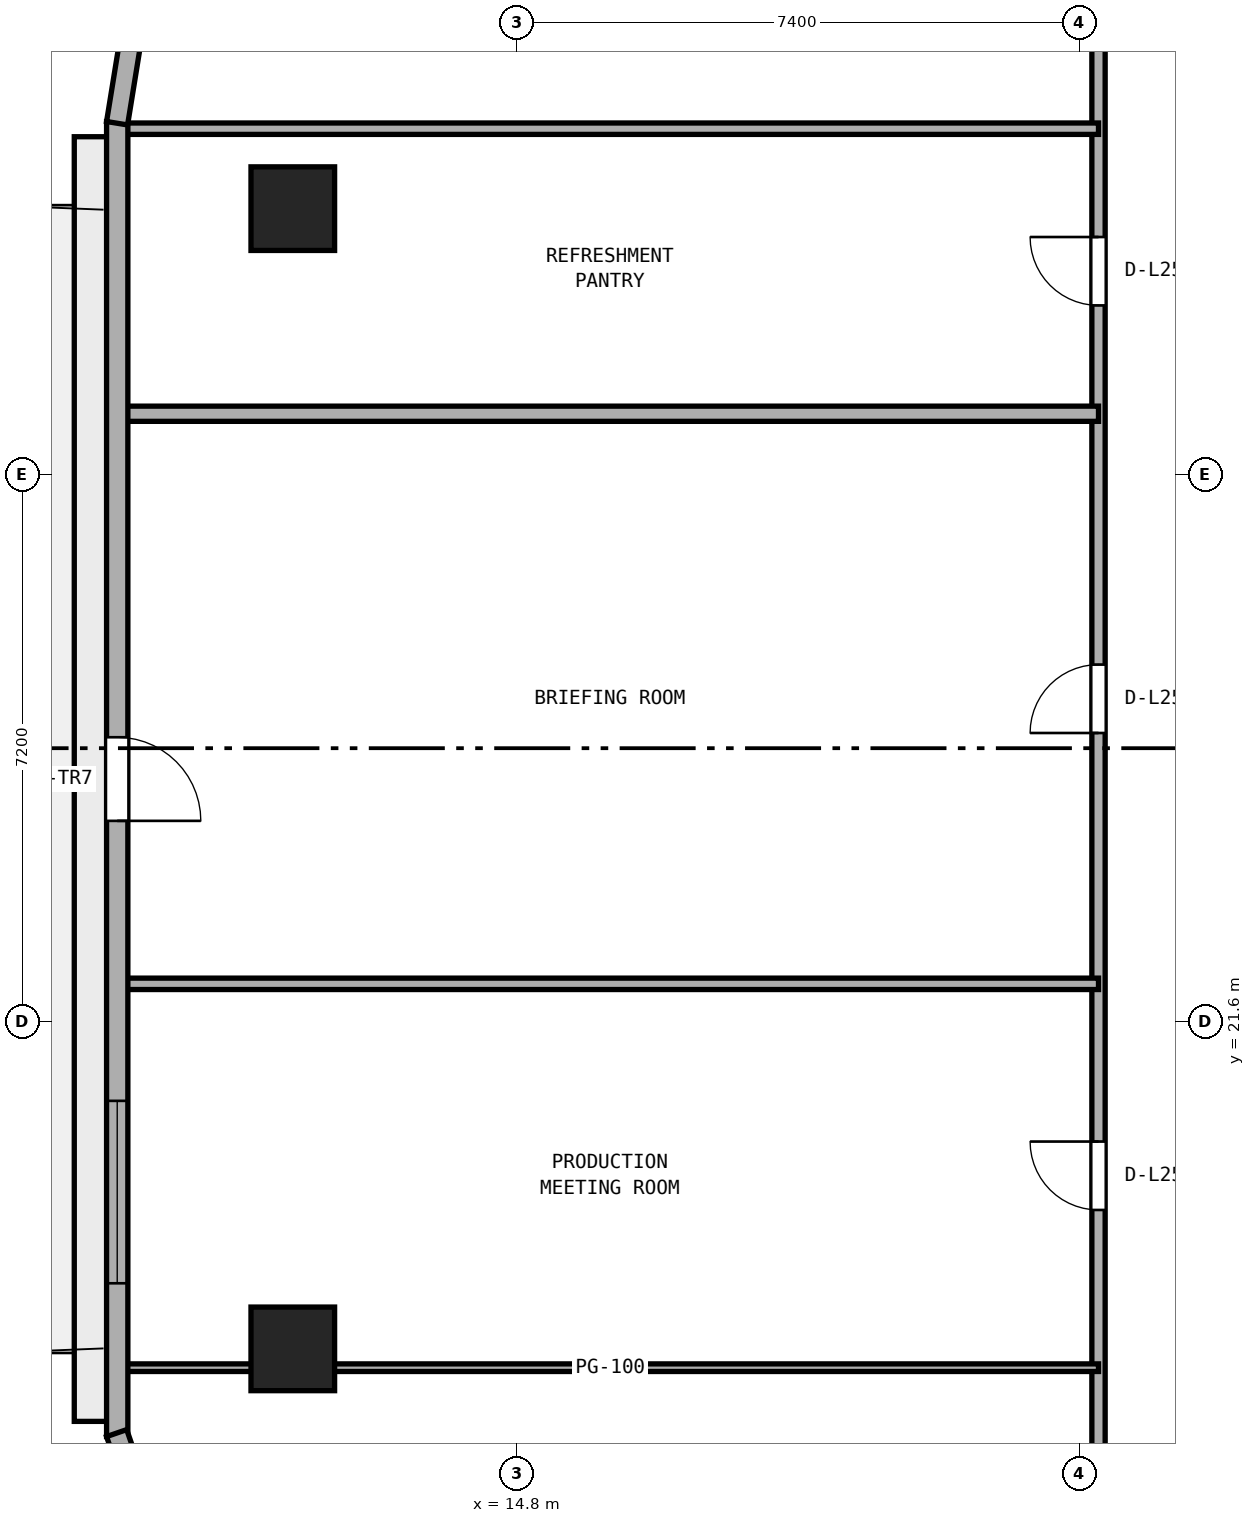
"""IFC4 building model, lengths in metres.
Left out: names, types, materials, properties, quantities, classifications, styles, units other than length and angle.
Written with IfcOpenShell. Run it as: python <this file> out.ifc"""

import sys

from ifc_helpers import new_model, si_unit, direction, frame, frame_2d, origin, origin_2d, place, context, subcontext, project, spatial, rectangle, extrude, element, fill, save


model = new_model("IFC4")
c1 = context("Model", 3, precision=1e-05, world=origin(), true_north=direction((0.0, 1.0)))
c2 = subcontext(c1, "Body", "Model", "MODEL_VIEW")
j1 = project(units=[si_unit("LENGTHUNIT", "METRE"), si_unit("PLANEANGLEUNIT", "RADIAN")], contexts=[c1])
p1 = place(None, origin())
s1 = spatial("IfcSite", under=j1, at=p1, CompositionType="ELEMENT")
p2 = place(p1, origin())
s2 = spatial("IfcBuilding", under=s1, at=p2, CompositionType="ELEMENT")
p3 = place(p2, frame((0.0, 0.0, 101.0)))
s3 = spatial("IfcBuildingStorey", under=s2, at=p3, CompositionType="ELEMENT", Elevation=101.0)
for number, where, z_axis, x_axis in (
    (1, (11.85, 32.298, 0.0), (0.0, 0.0, 1.0), (1.0, 0.0, 0.0)),
    (2, (11.85, 17.298, 0.0), (0.0, 0.0, 1.0), (1.0, 0.0, 0.0)),
):
    element("IfcColumn", number, at=place(p3, frame(where, z_axis=z_axis, x_axis=x_axis)), inside=s3, PredefinedType="COLUMN", context=c2, shape_type="SweptSolid", body=[
        extrude(rectangle(XDim=1.1, YDim=1.1, at=origin_2d()), origin(), (0.0, 0.0, 1.0), 3.8),
    ])
p4 = place(p3, frame((22.45, 14.05, 0.0), z_axis=(0.0, 0.0, 1.0), x_axis=(0.0, 1.0, 0.0)))
e3 = element("IfcWall", 3, at=p4, inside=s3, PredefinedType="PARTITIONING", context=c2, shape_type="SweptSolid", body=[
    extrude(rectangle(XDim=22.3, YDim=0.175, at=frame_2d((11.15, 0.0))), origin(), (0.0, 0.0, 1.0), 3.525),
])
p5 = place(p4, frame((5.075, 0.0, 0.0)))
e4 = element("IfcOpeningElement", 4, at=p5, cuts=e3, PredefinedType="OPENING", context=c2, shape_type="SweptSolid", body=[
    extrude(rectangle(XDim=0.9, YDim=2.1, at=frame_2d((0.45, 1.05))), frame((0.0, 0.097, 0.0), z_axis=(0.0, -1.0, 0.0), x_axis=(1.0, 0.0, 0.0)), (0.0, 0.0, 1.0), 0.195),
])
p6 = place(p4, frame((11.35, 0.0, 0.0)))
e5 = element("IfcOpeningElement", 5, at=p6, cuts=e3, PredefinedType="OPENING", context=c2, shape_type="SweptSolid", body=[
    extrude(rectangle(XDim=0.9, YDim=2.1, at=frame_2d((0.45, 1.05))), frame((0.0, 0.097, 0.0), z_axis=(0.0, -1.0, 0.0), x_axis=(1.0, 0.0, 0.0)), (0.0, 0.0, 1.0), 0.195),
])
p7 = place(p4, frame((16.975, 0.0, 0.0)))
e6 = element("IfcOpeningElement", 6, at=p7, cuts=e3, PredefinedType="OPENING", context=c2, shape_type="SweptSolid", body=[
    extrude(rectangle(XDim=0.9, YDim=2.1, at=frame_2d((0.45, 1.05))), frame((0.0, 0.097, 0.0), z_axis=(0.0, -1.0, 0.0), x_axis=(1.0, 0.0, 0.0)), (0.0, 0.0, 1.0), 0.195),
])
p8 = place(p3, frame((9.605, 17.05, 0.0), z_axis=(0.0, 0.0, 1.0), x_axis=(1.0, 0.0, 0.0)))
e7 = element("IfcWall", 7, at=p8, inside=s3, PredefinedType="PARTITIONING", context=c2, shape_type="SweptSolid", body=[
    extrude(rectangle(XDim=12.845, YDim=0.1, at=frame_2d((6.422, 0.0))), origin(), (0.0, 0.0, 1.0), 3.525),
])
p9 = place(p3, frame((9.605, 22.1, 0.0), z_axis=(0.0, 0.0, 1.0), x_axis=(1.0, 0.0, 0.0)))
e8 = element("IfcWall", 8, at=p9, inside=s3, PredefinedType="PARTITIONING", context=c2, shape_type="SweptSolid", body=[
    extrude(rectangle(XDim=12.845, YDim=0.15, at=frame_2d((6.422, 0.0))), origin(), (0.0, 0.0, 1.0), 3.525),
])
p10 = place(p3, frame((9.605, 29.6, 0.0), z_axis=(0.0, 0.0, 1.0), x_axis=(1.0, 0.0, 0.0)))
e9 = element("IfcWall", 9, at=p10, inside=s3, PredefinedType="PARTITIONING", context=c2, shape_type="SweptSolid", body=[
    extrude(rectangle(XDim=12.845, YDim=0.2, at=frame_2d((6.422, 0.0))), origin(), (0.0, 0.0, 1.0), 3.525),
])
p11 = place(p3, frame((9.605, 33.35, 0.0), z_axis=(0.0, 0.0, 1.0), x_axis=(1.0, 0.0, 0.0)))
e10 = element("IfcWall", 10, at=p11, inside=s3, PredefinedType="PARTITIONING", context=c2, shape_type="SweptSolid", body=[
    extrude(rectangle(XDim=12.845, YDim=0.15, at=frame_2d((6.422, 0.0))), origin(), (0.0, 0.0, 1.0), 3.525),
])
p12 = place(p3, frame((9.54, 33.444, 0.0), z_axis=(0.0, 0.0, 1.0), x_axis=(0.0, -1.0, 0.0)))
e11 = element("IfcWall", 11, at=p12, inside=s3, PredefinedType="STANDARD", context=c2, shape_type="SweptSolid", body=[
    extrude(rectangle(XDim=17.301, YDim=0.28, at=frame_2d((8.65, 0.0))), origin(), (0.0, 0.0, 1.0), 3.525),
])
p13 = place(p12, frame((8.1, 0.0, 0.0)))
e12 = element("IfcOpeningElement", 12, at=p13, cuts=e11, PredefinedType="OPENING", context=c2, shape_type="SweptSolid", body=[
    extrude(rectangle(XDim=1.1, YDim=2.2, at=frame_2d((0.55, 1.1))), frame((0.0, 0.15, 0.0), z_axis=(0.0, -1.0, 0.0), x_axis=(1.0, 0.0, 0.0)), (0.0, 0.0, 1.0), 0.3),
])
p14 = place(p12, frame((12.884, 0.0, 0.9)))
e13 = element("IfcOpeningElement", 13, at=p14, cuts=e11, PredefinedType="OPENING", context=c2, shape_type="SweptSolid", body=[
    extrude(rectangle(XDim=2.4, YDim=1.75, at=frame_2d((1.2, 0.875))), frame((0.0, 0.15, 0.0), z_axis=(0.0, -1.0, 0.0), x_axis=(1.0, 0.0, 0.0)), (0.0, 0.0, 1.0), 0.3),
])
p15 = place(p3, frame((9.753, 34.749, 0.0), z_axis=(0.0, 0.0, 1.0), x_axis=(-0.160037671962, -0.987110907423, 0.0)))
e14 = element("IfcWall", 14, at=p15, inside=s3, PredefinedType="STANDARD", context=c2, shape_type="SweptSolid", body=[
    extrude(rectangle(XDim=1.344, YDim=0.28, at=frame_2d((0.672, 0.0))), origin(), (0.0, 0.0, 1.0), 3.525),
])
p16 = place(p3, frame((9.532, 16.189, 0.0), z_axis=(0.0, 0.0, 1.0), x_axis=(0.32708309668, -0.944995580871, 0.0)))
e15 = element("IfcWall", 15, at=p16, inside=s3, PredefinedType="STANDARD", context=c2, shape_type="SweptSolid", body=[
    extrude(rectangle(XDim=2.748, YDim=0.28, at=frame_2d((1.374, 0.0))), origin(), (0.0, 0.0, 1.0), 3.525),
])
p17 = place(p5, origin())
e16 = element("IfcDoor", 16, at=p17, inside=s3, OperationType="SINGLE_SWING_RIGHT", PredefinedType="DOOR", context=c2, shape_type="SweptSolid", body=[
    extrude(rectangle(XDim=0.9, YDim=2.1, at=frame_2d((0.45, 1.05))), frame((0.0, 0.025, 0.0), z_axis=(0.0, -1.0, 0.0), x_axis=(1.0, 0.0, 0.0)), (0.0, 0.0, 1.0), 0.05),
])
fill(e4, e16)
p18 = place(p6, origin())
e17 = element("IfcDoor", 17, at=p18, inside=s3, OperationType="SINGLE_SWING_LEFT", PredefinedType="DOOR", context=c2, shape_type="SweptSolid", body=[
    extrude(rectangle(XDim=0.9, YDim=2.1, at=frame_2d((0.45, 1.05))), frame((0.0, 0.025, 0.0), z_axis=(0.0, -1.0, 0.0), x_axis=(1.0, 0.0, 0.0)), (0.0, 0.0, 1.0), 0.05),
])
fill(e5, e17)
p19 = place(p7, origin())
e18 = element("IfcDoor", 18, at=p19, inside=s3, OperationType="SINGLE_SWING_RIGHT", PredefinedType="DOOR", context=c2, shape_type="SweptSolid", body=[
    extrude(rectangle(XDim=0.9, YDim=2.1, at=frame_2d((0.45, 1.05))), frame((0.0, 0.025, 0.0), z_axis=(0.0, -1.0, 0.0), x_axis=(1.0, 0.0, 0.0)), (0.0, 0.0, 1.0), 0.05),
])
fill(e6, e18)
p20 = place(p13, origin())
e19 = element("IfcDoor", 19, at=p20, inside=s3, OperationType="SINGLE_SWING_RIGHT", PredefinedType="DOOR", context=c2, shape_type="SweptSolid", body=[
    extrude(rectangle(XDim=1.1, YDim=2.2, at=frame_2d((0.55, 1.1))), frame((0.0, 0.025, 0.0), z_axis=(0.0, -1.0, 0.0), x_axis=(1.0, 0.0, 0.0)), (0.0, 0.0, 1.0), 0.05),
])
fill(e12, e19)
p21 = place(p14, origin())
e20 = element("IfcWindow", 20, at=p21, inside=s3, PartitioningType="SINGLE_PANEL", PredefinedType="WINDOW", context=c2, shape_type="SweptSolid", body=[
    extrude(rectangle(XDim=2.4, YDim=1.75, at=frame_2d((1.2, 0.875))), frame((0.0, 0.03, 0.0), z_axis=(0.0, -1.0, 0.0), x_axis=(1.0, 0.0, 0.0)), (0.0, 0.0, 1.0), 0.06),
])
fill(e13, e20)
save(model, sys.argv[1])
